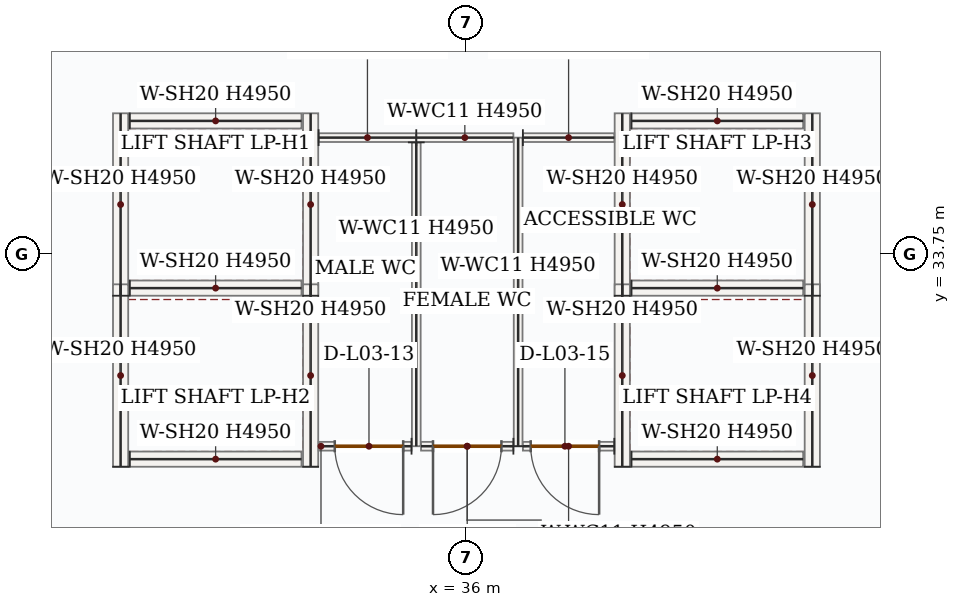
"""IFC4 building model, lengths in metres.
Left out: names, types, materials, properties, quantities, classifications, styles, units other than length and angle.
Written with IfcOpenShell. Run it as: python <this file> out.ifc"""

import sys

from ifc_helpers import new_model, si_unit, direction, frame, frame_2d, origin, place, context, subcontext, project, spatial, rectangle, extrude, source, transform, mapped, element, fill, save


model = new_model("IFC4")
c1 = context("Model", 3, precision=1e-05, world=origin(), true_north=direction((0.0, 1.0)))
c2 = subcontext(c1, "Body", "Model", "MODEL_VIEW")
j1 = project(units=[si_unit("LENGTHUNIT", "METRE"), si_unit("PLANEANGLEUNIT", "RADIAN")], contexts=[c1])
p1 = place(None, origin())
s1 = spatial("IfcSite", under=j1, at=p1, CompositionType="ELEMENT")
p2 = place(p1, origin())
s2 = spatial("IfcBuilding", under=s1, at=p2, CompositionType="ELEMENT")
p3 = place(p2, frame((0.0, 0.0, 18.0)))
s3 = spatial("IfcBuildingStorey", under=s2, at=p3, CompositionType="ELEMENT", Elevation=18.0)
m1 = source(origin(), c2, "Body", "SweptSolid", [
    extrude(rectangle(XDim=2.4, YDim=0.2, at=frame_2d((1.2, 0.0))), origin(), (0.0, 0.0, 1.0), 4.95),
])
for number, where, z_axis, x_axis in (
    (1, (31.45, 33.2, 0.0), (0.0, 0.0, 1.0), (0.0, 1.0, 0.0)),
    (2, (33.95, 33.2, 0.0), (0.0, 0.0, 1.0), (0.0, 1.0, 0.0)),
):
    element("IfcWall", number, at=place(p3, frame(where, z_axis=z_axis, x_axis=x_axis)), inside=s3, PredefinedType="SOLIDWALL", context=c2, shape_type="MappedRepresentation", body=[
        mapped(m1, transform((0.0, 0.0, 0.0), x_axis=(1.0, 0.0, 0.0), y_axis=(0.0, 1.0, 0.0), z_axis=(0.0, 0.0, 1.0), scale=1.0)),
    ])
m2 = source(origin(), c2, "Body", "SweptSolid", [
    extrude(rectangle(XDim=2.26, YDim=0.2, at=frame_2d((1.13, 0.0))), origin(), (0.0, 0.0, 1.0), 4.95),
])
for number, where, z_axis, x_axis in (
    (3, (31.57, 33.3, 0.0), (0.0, 0.0, 1.0), (1.0, 0.0, 0.0)),
    (4, (31.57, 35.5, 0.0), (0.0, 0.0, 1.0), (1.0, 0.0, 0.0)),
):
    element("IfcWall", number, at=place(p3, frame(where, z_axis=z_axis, x_axis=x_axis)), inside=s3, PredefinedType="SOLIDWALL", context=c2, shape_type="MappedRepresentation", body=[
        mapped(m2, transform((0.0, 0.0, 0.0), x_axis=(1.0, 0.0, 0.0), y_axis=(0.0, 1.0, 0.0), z_axis=(0.0, 0.0, 1.0), scale=1.0)),
    ])
for number, where, z_axis, x_axis in (
    (5, (31.45, 30.95, 0.0), (0.0, 0.0, 1.0), (0.0, 1.0, 0.0)),
    (6, (33.95, 30.95, 0.0), (0.0, 0.0, 1.0), (0.0, 1.0, 0.0)),
):
    element("IfcWall", number, at=place(p3, frame(where, z_axis=z_axis, x_axis=x_axis)), inside=s3, PredefinedType="SOLIDWALL", context=c2, shape_type="MappedRepresentation", body=[
        mapped(m1, transform((0.0, 0.0, 0.0), x_axis=(1.0, 0.0, 0.0), y_axis=(0.0, 1.0, 0.0), z_axis=(0.0, 0.0, 1.0), scale=1.0)),
    ])
p4 = place(p3, frame((31.57, 31.05, 0.0), z_axis=(0.0, 0.0, 1.0), x_axis=(1.0, 0.0, 0.0)))
e7 = element("IfcWall", 7, at=p4, inside=s3, PredefinedType="SOLIDWALL", context=c2, shape_type="MappedRepresentation", body=[
    mapped(m2, transform((0.0, 0.0, 0.0), x_axis=(1.0, 0.0, 0.0), y_axis=(0.0, 1.0, 0.0), z_axis=(0.0, 0.0, 1.0), scale=1.0)),
])
for number, where, z_axis, x_axis in (
    (8, (38.05, 33.2, 0.0), (0.0, 0.0, 1.0), (0.0, 1.0, 0.0)),
    (9, (40.55, 33.2, 0.0), (0.0, 0.0, 1.0), (0.0, 1.0, 0.0)),
):
    element("IfcWall", number, at=place(p3, frame(where, z_axis=z_axis, x_axis=x_axis)), inside=s3, PredefinedType="SOLIDWALL", context=c2, shape_type="MappedRepresentation", body=[
        mapped(m1, transform((0.0, 0.0, 0.0), x_axis=(1.0, 0.0, 0.0), y_axis=(0.0, 1.0, 0.0), z_axis=(0.0, 0.0, 1.0), scale=1.0)),
    ])
for number, where, z_axis, x_axis in (
    (10, (38.17, 33.3, 0.0), (0.0, 0.0, 1.0), (1.0, 0.0, 0.0)),
    (11, (38.17, 35.5, 0.0), (0.0, 0.0, 1.0), (1.0, 0.0, 0.0)),
):
    element("IfcWall", number, at=place(p3, frame(where, z_axis=z_axis, x_axis=x_axis)), inside=s3, PredefinedType="SOLIDWALL", context=c2, shape_type="MappedRepresentation", body=[
        mapped(m2, transform((0.0, 0.0, 0.0), x_axis=(1.0, 0.0, 0.0), y_axis=(0.0, 1.0, 0.0), z_axis=(0.0, 0.0, 1.0), scale=1.0)),
    ])
for number, where, z_axis, x_axis in (
    (12, (38.05, 30.95, 0.0), (0.0, 0.0, 1.0), (0.0, 1.0, 0.0)),
    (13, (40.55, 30.95, 0.0), (0.0, 0.0, 1.0), (0.0, 1.0, 0.0)),
):
    element("IfcWall", number, at=place(p3, frame(where, z_axis=z_axis, x_axis=x_axis)), inside=s3, PredefinedType="SOLIDWALL", context=c2, shape_type="MappedRepresentation", body=[
        mapped(m1, transform((0.0, 0.0, 0.0), x_axis=(1.0, 0.0, 0.0), y_axis=(0.0, 1.0, 0.0), z_axis=(0.0, 0.0, 1.0), scale=1.0)),
    ])
p5 = place(p3, frame((38.17, 31.05, 0.0), z_axis=(0.0, 0.0, 1.0), x_axis=(1.0, 0.0, 0.0)))
e14 = element("IfcWall", 14, at=p5, inside=s3, PredefinedType="SOLIDWALL", context=c2, shape_type="MappedRepresentation", body=[
    mapped(m2, transform((0.0, 0.0, 0.0), x_axis=(1.0, 0.0, 0.0), y_axis=(0.0, 1.0, 0.0), z_axis=(0.0, 0.0, 1.0), scale=1.0)),
])
m3 = source(origin(), c2, "Body", "SweptSolid", [
    extrude(rectangle(XDim=4.06, YDim=0.115, at=frame_2d((2.03, 0.0))), origin(), (0.0, 0.0, 1.0), 4.95),
])
p6 = place(p3, frame((36.68, 31.22, 0.0), z_axis=(0.0, 0.0, 1.0), x_axis=(0.0, 1.0, 0.0)))
e15 = element("IfcWall", 15, at=p6, inside=s3, PredefinedType="PARTITIONING", context=c2, shape_type="MappedRepresentation", body=[
    mapped(m3, transform((0.0, 0.0, 0.0), x_axis=(1.0, 0.0, 0.0), y_axis=(0.0, 1.0, 0.0), z_axis=(0.0, 0.0, 1.0), scale=1.0)),
])
m4 = source(origin(), c2, "Body", "SweptSolid", [
    extrude(rectangle(XDim=1.203, YDim=0.115, at=frame_2d((0.601, 0.0))), origin(), (0.0, 0.0, 1.0), 4.95),
])
p7 = place(p3, frame((36.742, 35.28, 0.0), z_axis=(0.0, 0.0, 1.0), x_axis=(1.0, 0.0, 0.0)))
e16 = element("IfcWall", 16, at=p7, inside=s3, PredefinedType="PARTITIONING", context=c2, shape_type="MappedRepresentation", body=[
    mapped(m4, transform((0.0, 0.0, 0.0), x_axis=(1.0, 0.0, 0.0), y_axis=(0.0, 1.0, 0.0), z_axis=(0.0, 0.0, 1.0), scale=1.0)),
])
p8 = place(p3, frame((37.945, 31.22, 0.0), z_axis=(0.0, 0.0, 1.0), x_axis=(-1.0, 0.0, 0.0)))
e17 = element("IfcWall", 17, at=p8, inside=s3, PredefinedType="PARTITIONING", context=c2, shape_type="SweptSolid", body=[
    extrude(rectangle(XDim=1.203, YDim=0.115, at=frame_2d((0.601, 0.0))), origin(), (0.0, 0.0, 1.0), 4.95),
])
p9 = place(p8, frame((0.2, 0.0, 0.0)))
e18 = element("IfcOpeningElement", 18, at=p9, cuts=e17, PredefinedType="OPENING", context=c2, shape_type="SweptSolid", body=[
    extrude(rectangle(XDim=0.9, YDim=2.1, at=frame_2d((0.45, 1.05))), frame((0.0, 0.067, 0.0), z_axis=(0.0, -1.0, 0.0), x_axis=(1.0, 0.0, 0.0)), (0.0, 0.0, 1.0), 0.135),
])
m5 = source(origin(), c2, "Body", "SweptSolid", [
    extrude(rectangle(XDim=1.285, YDim=0.115, at=frame_2d((0.643, 0.0))), origin(), (0.0, 0.0, 1.0), 4.95),
])
p10 = place(p3, frame((34.055, 35.28, 0.0), z_axis=(0.0, 0.0, 1.0), x_axis=(1.0, 0.0, 0.0)))
e19 = element("IfcWall", 19, at=p10, inside=s3, PredefinedType="PARTITIONING", context=c2, shape_type="MappedRepresentation", body=[
    mapped(m5, transform((0.0, 0.0, 0.0), x_axis=(1.0, 0.0, 0.0), y_axis=(0.0, 1.0, 0.0), z_axis=(0.0, 0.0, 1.0), scale=1.0)),
])
m6 = source(origin(), c2, "Body", "SweptSolid", [
    extrude(rectangle(XDim=3.998, YDim=0.115, at=frame_2d((1.999, 0.0))), origin(), (0.0, 0.0, 1.0), 4.95),
])
p11 = place(p3, frame((35.34, 35.218, 0.0), z_axis=(0.0, 0.0, 1.0), x_axis=(0.0, -1.0, 0.0)))
e20 = element("IfcWall", 20, at=p11, inside=s3, PredefinedType="PARTITIONING", context=c2, shape_type="MappedRepresentation", body=[
    mapped(m6, transform((0.0, 0.0, 0.0), x_axis=(1.0, 0.0, 0.0), y_axis=(0.0, 1.0, 0.0), z_axis=(0.0, 0.0, 1.0), scale=1.0)),
])
p12 = place(p3, frame((35.278, 31.22, 0.0), z_axis=(0.0, 0.0, 1.0), x_axis=(-1.0, 0.0, 0.0)))
e21 = element("IfcWall", 21, at=p12, inside=s3, PredefinedType="PARTITIONING", context=c2, shape_type="SweptSolid", body=[
    extrude(rectangle(XDim=1.223, YDim=0.115, at=frame_2d((0.611, 0.0))), origin(), (0.0, 0.0, 1.0), 4.95),
])
p13 = place(p12, frame((0.11, 0.0, 0.0)))
e22 = element("IfcOpeningElement", 22, at=p13, cuts=e21, PredefinedType="OPENING", context=c2, shape_type="SweptSolid", body=[
    extrude(rectangle(XDim=0.9, YDim=2.1, at=frame_2d((0.45, 1.05))), frame((0.0, 0.067, 0.0), z_axis=(0.0, -1.0, 0.0), x_axis=(1.0, 0.0, 0.0)), (0.0, 0.0, 1.0), 0.135),
])
m7 = source(origin(), c2, "Body", "SweptSolid", [
    extrude(rectangle(XDim=1.277, YDim=0.115, at=frame_2d((0.639, 0.0))), origin(), (0.0, 0.0, 1.0), 4.95),
])
p14 = place(p3, frame((35.34, 35.28, 0.0), z_axis=(0.0, 0.0, 1.0), x_axis=(1.0, 0.0, 0.0)))
e23 = element("IfcWall", 23, at=p14, inside=s3, PredefinedType="PARTITIONING", context=c2, shape_type="MappedRepresentation", body=[
    mapped(m7, transform((0.0, 0.0, 0.0), x_axis=(1.0, 0.0, 0.0), y_axis=(0.0, 1.0, 0.0), z_axis=(0.0, 0.0, 1.0), scale=1.0)),
])
p15 = place(p3, frame((36.617, 31.22, 0.0), z_axis=(0.0, 0.0, 1.0), x_axis=(-1.0, 0.0, 0.0)))
e24 = element("IfcWall", 24, at=p15, inside=s3, PredefinedType="PARTITIONING", context=c2, shape_type="SweptSolid", body=[
    extrude(rectangle(XDim=1.215, YDim=0.115, at=frame_2d((0.607, 0.0))), origin(), (0.0, 0.0, 1.0), 4.95),
])
p16 = place(p15, frame((0.157, 0.0, 0.0)))
e25 = element("IfcOpeningElement", 25, at=p16, cuts=e24, PredefinedType="OPENING", context=c2, shape_type="SweptSolid", body=[
    extrude(rectangle(XDim=0.9, YDim=2.1, at=frame_2d((0.45, 1.05))), frame((0.0, 0.067, 0.0), z_axis=(0.0, -1.0, 0.0), x_axis=(1.0, 0.0, 0.0)), (0.0, 0.0, 1.0), 0.135),
])
m8 = source(origin(), c2, "Body", "SweptSolid", [
    extrude(rectangle(XDim=0.9, YDim=2.1, at=frame_2d((0.45, 1.05))), frame((0.0, 0.025, 0.0), z_axis=(0.0, -1.0, 0.0), x_axis=(1.0, 0.0, 0.0)), (0.0, 0.0, 1.0), 0.05),
])
p17 = place(p13, origin())
e26 = element("IfcDoor", 26, at=p17, inside=s3, OperationType="SINGLE_SWING_LEFT", PredefinedType="DOOR", context=c2, shape_type="MappedRepresentation", body=[
    mapped(m8, transform((0.0, 0.0, 0.0), x_axis=(1.0, 0.0, 0.0), y_axis=(0.0, 1.0, 0.0), z_axis=(0.0, 0.0, 1.0), scale=1.0)),
])
fill(e22, e26)
p18 = place(p16, origin())
e27 = element("IfcDoor", 27, at=p18, inside=s3, OperationType="SINGLE_SWING_RIGHT", PredefinedType="DOOR", context=c2, shape_type="MappedRepresentation", body=[
    mapped(m8, transform((0.0, 0.0, 0.0), x_axis=(1.0, 0.0, 0.0), y_axis=(0.0, 1.0, 0.0), z_axis=(0.0, 0.0, 1.0), scale=1.0)),
])
fill(e25, e27)
p19 = place(p9, origin())
e28 = element("IfcDoor", 28, at=p19, inside=s3, OperationType="SINGLE_SWING_LEFT", PredefinedType="DOOR", context=c2, shape_type="MappedRepresentation", body=[
    mapped(m8, transform((0.0, 0.0, 0.0), x_axis=(1.0, 0.0, 0.0), y_axis=(0.0, 1.0, 0.0), z_axis=(0.0, 0.0, 1.0), scale=1.0)),
])
fill(e18, e28)
save(model, sys.argv[1])
